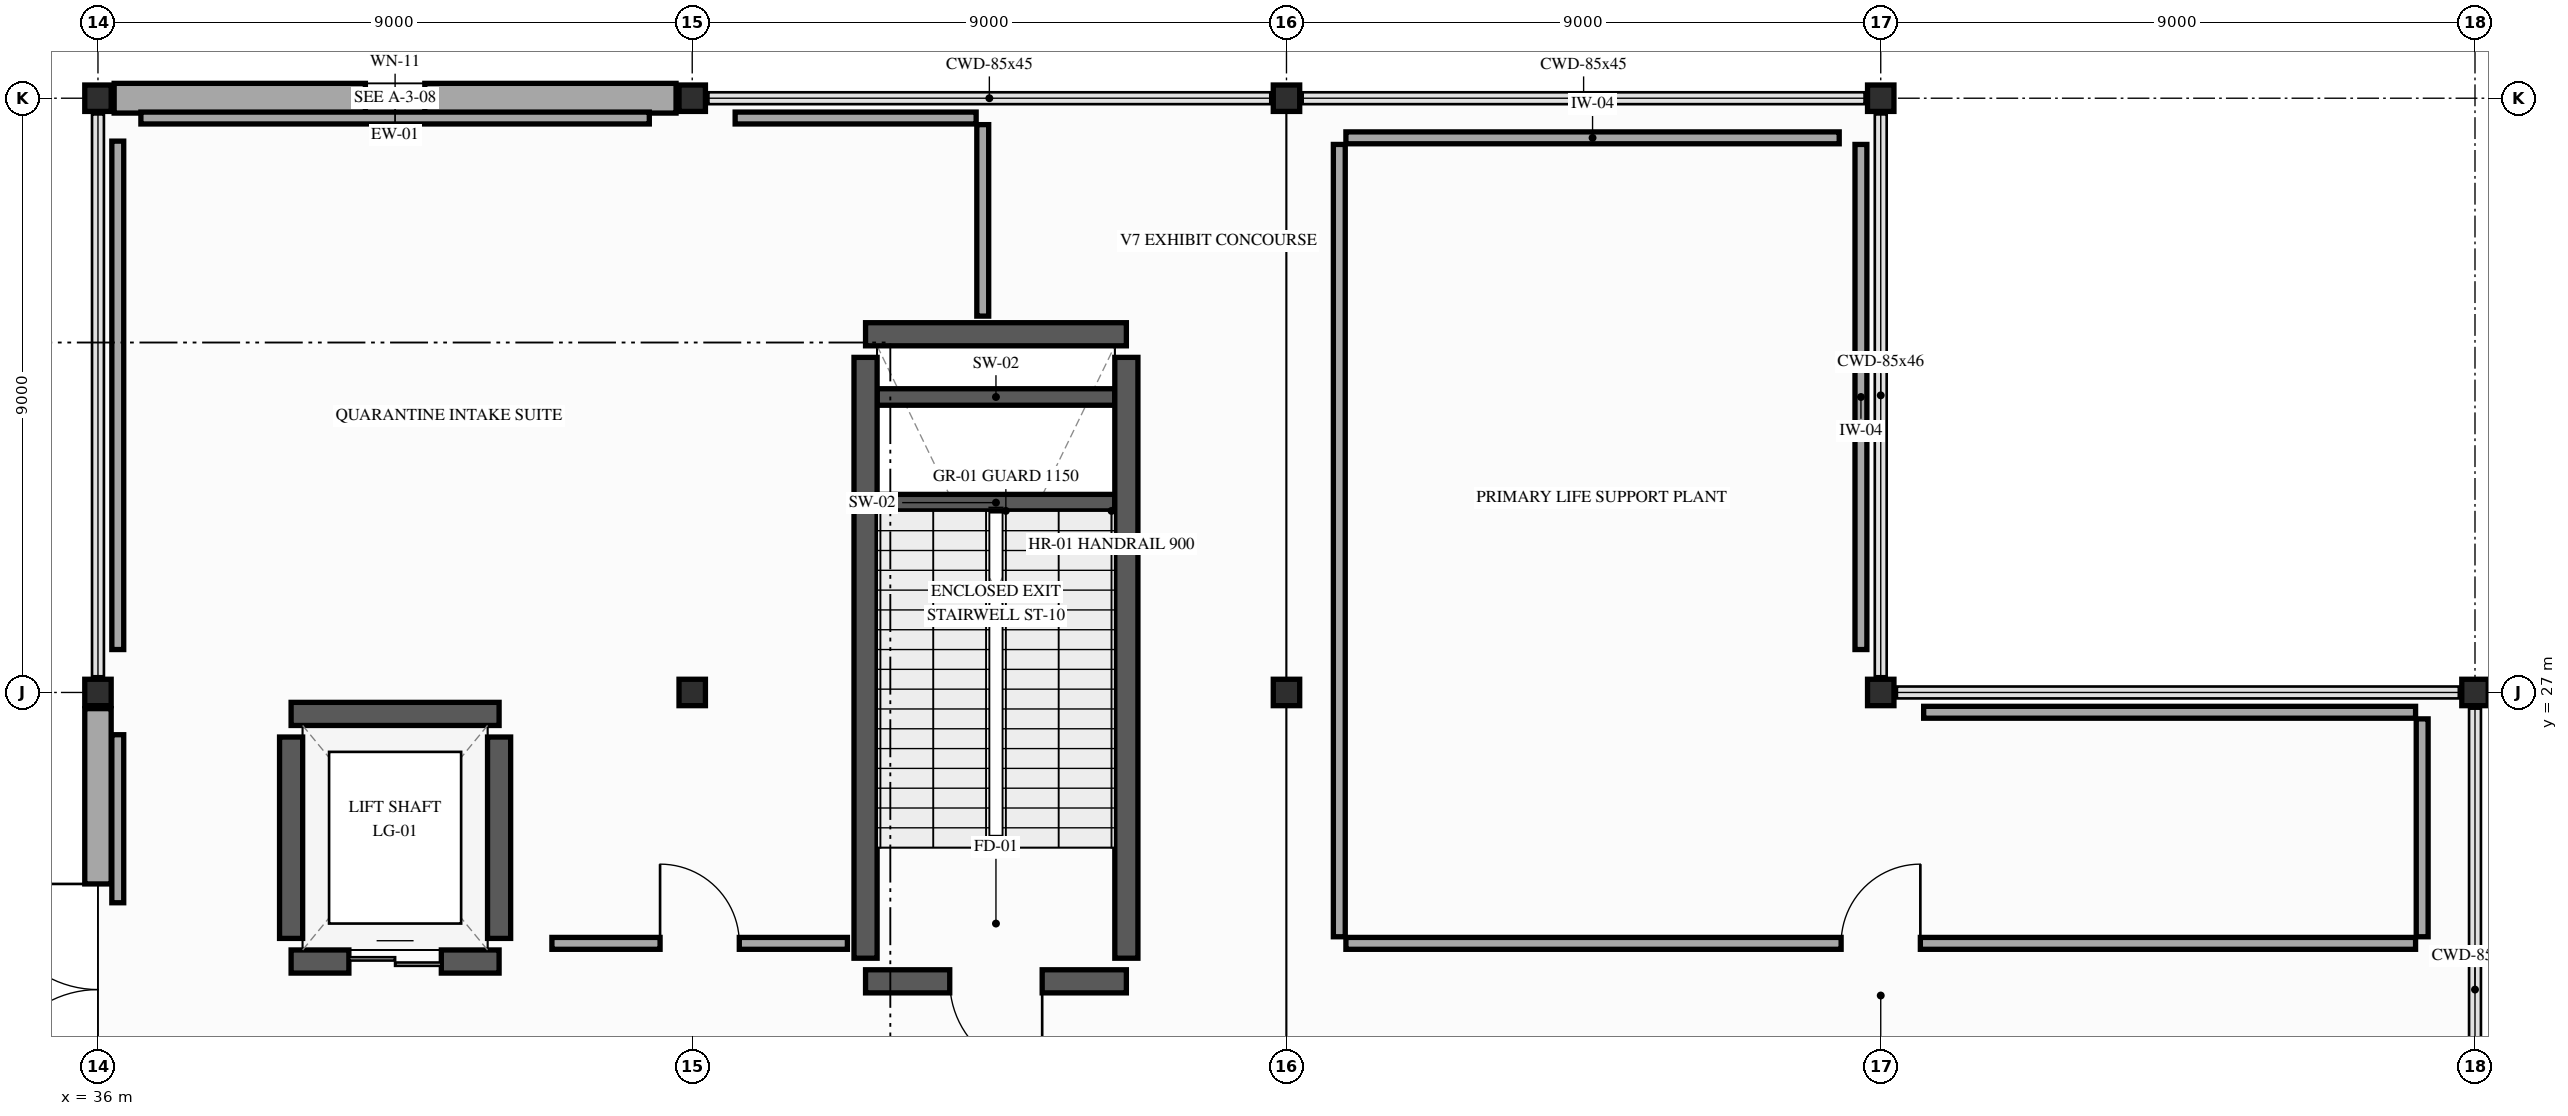
"""IFC4 building model, lengths in metres.
Left out: names, types, materials, properties, quantities, classifications, styles, units other than length and angle.
Written with IfcOpenShell. Run it as: python <this file> out.ifc"""

import sys

from ifc_helpers import new_model, si_unit, direction, frame, frame_2d, origin, origin_2d, place, context, subcontext, project, spatial, rectangle, i_section, extrude, element, fill, save


model = new_model("IFC4")
c1 = context("Model", 3, precision=1e-05, world=origin(), true_north=direction((0.0, 1.0)))
c2 = subcontext(c1, "Body", "Model", "MODEL_VIEW")
j1 = project(units=[si_unit("LENGTHUNIT", "METRE"), si_unit("PLANEANGLEUNIT", "RADIAN")], contexts=[c1])
p1 = place(None, origin())
s1 = spatial("IfcSite", under=j1, at=p1, CompositionType="ELEMENT")
p2 = place(p1, origin())
s2 = spatial("IfcBuilding", under=s1, at=p2, CompositionType="ELEMENT")
p3 = place(p2, origin())
s3 = spatial("IfcBuildingStorey", under=s2, at=p3, CompositionType="ELEMENT", Elevation=0.0)
for number, where, z_axis, x_axis in (
    (1, (36.0, 27.0, 0.0), (0.0, 0.0, 1.0), (1.0, 0.0, 0.0)),
    (2, (36.0, 36.0, 0.0), (0.0, 0.0, 1.0), (1.0, 0.0, 0.0)),
    (3, (45.0, 27.0, 0.0), (0.0, 0.0, 1.0), (1.0, 0.0, 0.0)),
    (4, (45.0, 36.0, 0.0), (0.0, 0.0, 1.0), (1.0, 0.0, 0.0)),
    (5, (54.0, 27.0, 0.0), (0.0, 0.0, 1.0), (1.0, 0.0, 0.0)),
    (6, (54.0, 36.0, 0.0), (0.0, 0.0, 1.0), (1.0, 0.0, 0.0)),
    (7, (63.0, 27.0, 0.0), (0.0, 0.0, 1.0), (1.0, 0.0, 0.0)),
    (8, (63.0, 36.0, 0.0), (0.0, 0.0, 1.0), (1.0, 0.0, 0.0)),
    (9, (72.0, 27.0, 0.0), (0.0, 0.0, 1.0), (1.0, 0.0, 0.0)),
):
    element("IfcColumn", number, at=place(p3, frame(where, z_axis=z_axis, x_axis=x_axis)), inside=s3, PredefinedType="COLUMN", context=c2, shape_type="SweptSolid", body=[
        extrude(i_section(OverallWidth=0.4, OverallDepth=0.4, WebThickness=0.013, FlangeThickness=0.021, FilletRadius=0.022, at=origin_2d()), origin(), (0.0, 0.0, 1.0), 5.4),
    ])
p4 = place(p3, frame((36.245, 36.0, 0.0), z_axis=(0.0, 0.0, 1.0), x_axis=(1.0, 0.0, 0.0)))
e10 = element("IfcWall", 10, at=p4, inside=s3, PredefinedType="SOLIDWALL", context=c2, shape_type="SweptSolid", body=[
    extrude(rectangle(XDim=8.51, YDim=0.45, at=frame_2d((4.255, 0.0))), origin(), (0.0, 0.0, 1.0), 4.517),
])
p5 = place(p4, frame((3.805, 0.0, 0.9)))
e11 = element("IfcOpeningElement", 11, at=p5, cuts=e10, PredefinedType="OPENING", context=c2, shape_type="SweptSolid", body=[
    extrude(rectangle(XDim=0.9, YDim=2.2, at=frame_2d((0.45, 1.1))), frame((0.0, 0.235, 0.0), z_axis=(0.0, -1.0, 0.0), x_axis=(1.0, 0.0, 0.0)), (0.0, 0.0, 1.0), 0.47),
])
p6 = place(p3, frame((36.0, 18.245, 0.0), z_axis=(0.0, 0.0, 1.0), x_axis=(0.0, 1.0, 0.0)))
e12 = element("IfcWall", 12, at=p6, inside=s3, PredefinedType="SOLIDWALL", context=c2, shape_type="SweptSolid", body=[
    extrude(rectangle(XDim=8.51, YDim=0.4, at=frame_2d((4.255, 0.0))), origin(), (0.0, 0.0, 1.0), 4.517),
])
p7 = place(p6, frame((2.655, 0.0, 0.0)))
e13 = element("IfcOpeningElement", 13, at=p7, cuts=e12, PredefinedType="OPENING", context=c2, shape_type="SweptSolid", body=[
    extrude(rectangle(XDim=3.2, YDim=2.8, at=frame_2d((1.6, 1.4))), frame((0.0, 0.21, 0.0), z_axis=(0.0, -1.0, 0.0), x_axis=(1.0, 0.0, 0.0)), (0.0, 0.0, 1.0), 0.42),
])
for number, where, z_axis, x_axis in (
    (14, (47.8, 29.875, 0.0), (0.0, 0.0, 1.0), (1.0, 0.0, 0.0)),
    (15, (47.8, 31.475, 0.0), (0.0, 0.0, 1.0), (1.0, 0.0, 0.0)),
):
    element("IfcWall", number, at=place(p3, frame(where, z_axis=z_axis, x_axis=x_axis)), inside=s3, PredefinedType="SHEAR", context=c2, shape_type="SweptSolid", body=[
        extrude(rectangle(XDim=3.6, YDim=0.25, at=frame_2d((1.8, 0.0))), origin(), (0.0, 0.0, 1.0), 2.5),
    ])
p8 = place(p3, frame((51.575, 22.625, 0.0), z_axis=(0.0, 0.0, 1.0), x_axis=(-1.0, 0.0, 0.0)))
e16 = element("IfcWall", 16, at=p8, inside=s3, PredefinedType="SHEAR", context=c2, shape_type="SweptSolid", body=[
    extrude(rectangle(XDim=3.95, YDim=0.35, at=frame_2d((1.975, 0.0))), origin(), (0.0, 0.0, 1.0), 5.12),
])
p9 = place(p8, frame((1.275, 0.0, 0.0)))
e17 = element("IfcOpeningElement", 17, at=p9, cuts=e16, PredefinedType="OPENING", context=c2, shape_type="SweptSolid", body=[
    extrude(rectangle(XDim=1.4, YDim=2.2, at=frame_2d((0.7, 1.1))), frame((0.0, 0.185, 0.0), z_axis=(0.0, -1.0, 0.0), x_axis=(1.0, 0.0, 0.0)), (0.0, 0.0, 1.0), 0.37),
])
p10 = place(p3, frame((47.625, 32.425, 0.0), z_axis=(0.0, 0.0, 1.0), x_axis=(1.0, 0.0, 0.0)))
e18 = element("IfcWall", 18, at=p10, inside=s3, PredefinedType="SHEAR", context=c2, shape_type="SweptSolid", body=[
    extrude(rectangle(XDim=3.95, YDim=0.35, at=frame_2d((1.975, 0.0))), origin(), (0.0, 0.0, 1.0), 5.12),
])
for number, where, z_axis, x_axis in (
    (19, (47.625, 22.975, 0.0), (0.0, 0.0, 1.0), (0.0, 1.0, 0.0)),
    (20, (51.575, 22.975, 0.0), (0.0, 0.0, 1.0), (0.0, 1.0, 0.0)),
):
    element("IfcWall", number, at=place(p3, frame(where, z_axis=z_axis, x_axis=x_axis)), inside=s3, PredefinedType="SHEAR", context=c2, shape_type="SweptSolid", body=[
        extrude(rectangle(XDim=9.1, YDim=0.35, at=frame_2d((4.55, 0.0))), origin(), (0.0, 0.0, 1.0), 5.12),
    ])
p11 = place(p3, frame((38.925, 22.925, 0.0), z_axis=(0.0, 0.0, 1.0), x_axis=(1.0, 0.0, 0.0)))
e21 = element("IfcWall", 21, at=p11, inside=s3, PredefinedType="SHEAR", context=c2, shape_type="SweptSolid", body=[
    extrude(rectangle(XDim=3.15, YDim=0.35, at=frame_2d((1.575, 0.0))), origin(), (0.0, 0.0, 1.0), 5.12),
])
p12 = place(p11, frame((0.875, 0.0, 0.0)))
e22 = element("IfcOpeningElement", 22, at=p12, cuts=e21, PredefinedType="OPENING", context=c2, shape_type="SweptSolid", body=[
    extrude(rectangle(XDim=1.4, YDim=2.3, at=frame_2d((0.7, 1.15))), frame((0.0, 0.185, 0.0), z_axis=(0.0, -1.0, 0.0), x_axis=(1.0, 0.0, 0.0)), (0.0, 0.0, 1.0), 0.37),
])
p13 = place(p3, frame((42.075, 26.675, 0.0), z_axis=(0.0, 0.0, 1.0), x_axis=(-1.0, 0.0, 0.0)))
e23 = element("IfcWall", 23, at=p13, inside=s3, PredefinedType="SHEAR", context=c2, shape_type="SweptSolid", body=[
    extrude(rectangle(XDim=3.15, YDim=0.35, at=frame_2d((1.575, 0.0))), origin(), (0.0, 0.0, 1.0), 5.12),
])
for number, where, z_axis, x_axis in (
    (24, (38.925, 23.275, 0.0), (0.0, 0.0, 1.0), (0.0, 1.0, 0.0)),
    (25, (42.075, 23.275, 0.0), (0.0, 0.0, 1.0), (0.0, 1.0, 0.0)),
):
    element("IfcWall", number, at=place(p3, frame(where, z_axis=z_axis, x_axis=x_axis)), inside=s3, PredefinedType="SHEAR", context=c2, shape_type="SweptSolid", body=[
        extrude(rectangle(XDim=3.05, YDim=0.35, at=frame_2d((1.525, 0.0))), origin(), (0.0, 0.0, 1.0), 5.12),
    ])
p14 = place(p3, frame((62.7, 27.65, 0.0), z_axis=(0.0, 0.0, 1.0), x_axis=(0.0, 1.0, 0.0)))
e26 = element("IfcWall", 26, at=p14, inside=s3, PredefinedType="PARTITIONING", context=c2, shape_type="SweptSolid", body=[
    extrude(rectangle(XDim=7.65, YDim=0.18, at=frame_2d((3.825, 0.0))), origin(), (0.0, 0.0, 1.0), 4.617),
])
p15 = place(p3, frame((62.371, 35.4, 0.0), z_axis=(0.0, 0.0, 1.0), x_axis=(-1.0, 0.0, 0.0)))
e27 = element("IfcWall", 27, at=p15, inside=s3, PredefinedType="PARTITIONING", context=c2, shape_type="SweptSolid", body=[
    extrude(rectangle(XDim=7.471, YDim=0.18, at=frame_2d((3.736, 0.0))), origin(), (0.0, 0.0, 1.0), 5.05),
])
p16 = place(p3, frame((54.8, 35.3, 0.0), z_axis=(0.0, 0.0, 1.0), x_axis=(0.0, -1.0, 0.0)))
e28 = element("IfcWall", 28, at=p16, inside=s3, PredefinedType="PARTITIONING", context=c2, shape_type="SweptSolid", body=[
    extrude(rectangle(XDim=12.0, YDim=0.18, at=frame_2d((6.0, 0.0))), origin(), (0.0, 0.0, 1.0), 4.517),
])
p17 = place(p3, frame((54.9, 23.2, 0.0), z_axis=(0.0, 0.0, 1.0), x_axis=(1.0, 0.0, 0.0)))
e29 = element("IfcWall", 29, at=p17, inside=s3, PredefinedType="PARTITIONING", context=c2, shape_type="SweptSolid", body=[
    extrude(rectangle(XDim=16.2, YDim=0.18, at=frame_2d((8.1, 0.0))), origin(), (0.0, 0.0, 1.0), 4.617),
])
p18 = place(p17, frame((7.5, 0.0, 0.0)))
e30 = element("IfcOpeningElement", 30, at=p18, cuts=e29, PredefinedType="OPENING", context=c2, shape_type="SweptSolid", body=[
    extrude(rectangle(XDim=1.2, YDim=2.2, at=frame_2d((0.6, 1.1))), frame((0.0, 0.1, 0.0), z_axis=(0.0, -1.0, 0.0), x_axis=(1.0, 0.0, 0.0)), (0.0, 0.0, 1.0), 0.2),
])
p19 = place(p3, frame((71.2, 23.3, 0.0), z_axis=(0.0, 0.0, 1.0), x_axis=(0.0, 1.0, 0.0)))
e31 = element("IfcWall", 31, at=p19, inside=s3, PredefinedType="PARTITIONING", context=c2, shape_type="SweptSolid", body=[
    extrude(rectangle(XDim=3.3, YDim=0.18, at=frame_2d((1.65, 0.0))), origin(), (0.0, 0.0, 1.0), 4.517),
])
p20 = place(p3, frame((71.1, 26.7, 0.0), z_axis=(0.0, 0.0, 1.0), x_axis=(-1.0, 0.0, 0.0)))
e32 = element("IfcWall", 32, at=p20, inside=s3, PredefinedType="PARTITIONING", context=c2, shape_type="SweptSolid", body=[
    extrude(rectangle(XDim=7.45, YDim=0.18, at=frame_2d((3.725, 0.0))), origin(), (0.0, 0.0, 1.0), 4.517),
])
p21 = place(p3, frame((36.3, 26.36, 0.0), z_axis=(0.0, 0.0, 1.0), x_axis=(0.0, -1.0, 0.0)))
e33 = element("IfcWall", 33, at=p21, inside=s3, PredefinedType="PARTITIONING", context=c2, shape_type="SweptSolid", body=[
    extrude(rectangle(XDim=2.545, YDim=0.18, at=frame_2d((1.272, 0.0))), origin(), (0.0, 0.0, 1.0), 4.617),
])
p22 = place(p3, frame((42.875, 23.2, 0.0), z_axis=(0.0, 0.0, 1.0), x_axis=(1.0, 0.0, 0.0)))
e34 = element("IfcWall", 34, at=p22, inside=s3, PredefinedType="PARTITIONING", context=c2, shape_type="SweptSolid", body=[
    extrude(rectangle(XDim=4.475, YDim=0.18, at=frame_2d((2.238, 0.0))), origin(), (0.0, 0.0, 1.0), 4.617),
])
p23 = place(p22, frame((1.638, 0.0, 0.0)))
e35 = element("IfcOpeningElement", 35, at=p23, cuts=e34, PredefinedType="OPENING", context=c2, shape_type="SweptSolid", body=[
    extrude(rectangle(XDim=1.2, YDim=2.2, at=frame_2d((0.6, 1.1))), frame((0.0, 0.1, 0.0), z_axis=(0.0, -1.0, 0.0), x_axis=(1.0, 0.0, 0.0)), (0.0, 0.0, 1.0), 0.2),
])
p24 = place(p3, frame((49.4, 32.7, 0.0), z_axis=(0.0, 0.0, 1.0), x_axis=(0.0, 1.0, 0.0)))
e36 = element("IfcWall", 36, at=p24, inside=s3, PredefinedType="PARTITIONING", context=c2, shape_type="SweptSolid", body=[
    extrude(rectangle(XDim=2.9, YDim=0.18, at=frame_2d((1.45, 0.0))), origin(), (0.0, 0.0, 1.0), 4.517),
])
p25 = place(p3, frame((49.3, 35.7, 0.0), z_axis=(0.0, 0.0, 1.0), x_axis=(-1.0, 0.0, 0.0)))
e37 = element("IfcWall", 37, at=p25, inside=s3, PredefinedType="PARTITIONING", context=c2, shape_type="SweptSolid", body=[
    extrude(rectangle(XDim=3.65, YDim=0.18, at=frame_2d((1.825, 0.0))), origin(), (0.0, 0.0, 1.0), 4.517),
])
p26 = place(p3, frame((44.35, 35.7, 0.0), z_axis=(0.0, 0.0, 1.0), x_axis=(-1.0, 0.0, 0.0)))
e38 = element("IfcWall", 38, at=p26, inside=s3, PredefinedType="PARTITIONING", context=c2, shape_type="SweptSolid", body=[
    extrude(rectangle(XDim=7.7, YDim=0.18, at=frame_2d((3.85, 0.0))), origin(), (0.0, 0.0, 1.0), 4.517),
])
p27 = place(p3, frame((36.3, 35.35, 0.0), z_axis=(0.0, 0.0, 1.0), x_axis=(0.0, -1.0, 0.0)))
e39 = element("IfcWall", 39, at=p27, inside=s3, PredefinedType="PARTITIONING", context=c2, shape_type="SweptSolid", body=[
    extrude(rectangle(XDim=7.7, YDim=0.18, at=frame_2d((3.85, 0.0))), origin(), (0.0, 0.0, 1.0), 4.617),
])
p28 = place(p5, origin())
e40 = element("IfcWindow", 40, at=p28, inside=s3, PartitioningType="SINGLE_PANEL", PredefinedType="WINDOW", context=c2, shape_type="SweptSolid", body=[
    extrude(rectangle(XDim=0.9, YDim=2.2, at=frame_2d((0.45, 1.1))), frame((0.0, 0.03, 0.0), z_axis=(0.0, -1.0, 0.0), x_axis=(1.0, 0.0, 0.0)), (0.0, 0.0, 1.0), 0.06),
])
fill(e11, e40)
p29 = place(p7, origin())
e41 = element("IfcDoor", 41, at=p29, inside=s3, OperationType="DOUBLE_DOOR_SINGLE_SWING", PredefinedType="DOOR", context=c2, shape_type="SweptSolid", body=[
    extrude(rectangle(XDim=3.2, YDim=2.8, at=frame_2d((1.6, 1.4))), frame((0.0, 0.025, 0.0), z_axis=(0.0, -1.0, 0.0), x_axis=(1.0, 0.0, 0.0)), (0.0, 0.0, 1.0), 0.05),
])
fill(e13, e41)
p30 = place(p9, origin())
e42 = element("IfcDoor", 42, at=p30, inside=s3, OperationType="SINGLE_SWING_LEFT", PredefinedType="DOOR", context=c2, shape_type="SweptSolid", body=[
    extrude(rectangle(XDim=1.4, YDim=2.2, at=frame_2d((0.7, 1.1))), frame((0.0, 0.025, 0.0), z_axis=(0.0, -1.0, 0.0), x_axis=(1.0, 0.0, 0.0)), (0.0, 0.0, 1.0), 0.05),
])
fill(e17, e42)
p31 = place(p12, origin())
e43 = element("IfcDoor", 43, at=p31, inside=s3, OperationType="DOUBLE_DOOR_SLIDING", PredefinedType="DOOR", context=c2, shape_type="SweptSolid", body=[
    extrude(rectangle(XDim=1.4, YDim=2.3, at=frame_2d((0.7, 1.15))), frame((0.0, 0.025, 0.0), z_axis=(0.0, -1.0, 0.0), x_axis=(1.0, 0.0, 0.0)), (0.0, 0.0, 1.0), 0.05),
])
fill(e22, e43)
p32 = place(p18, origin())
e44 = element("IfcDoor", 44, at=p32, inside=s3, OperationType="SINGLE_SWING_RIGHT", PredefinedType="DOOR", context=c2, shape_type="SweptSolid", body=[
    extrude(rectangle(XDim=1.2, YDim=2.2, at=frame_2d((0.6, 1.1))), frame((0.0, 0.025, 0.0), z_axis=(0.0, -1.0, 0.0), x_axis=(1.0, 0.0, 0.0)), (0.0, 0.0, 1.0), 0.05),
])
fill(e30, e44)
p33 = place(p23, origin())
e45 = element("IfcDoor", 45, at=p33, inside=s3, OperationType="SINGLE_SWING_LEFT", PredefinedType="DOOR", context=c2, shape_type="SweptSolid", body=[
    extrude(rectangle(XDim=1.2, YDim=2.2, at=frame_2d((0.6, 1.1))), frame((0.0, 0.025, 0.0), z_axis=(0.0, -1.0, 0.0), x_axis=(1.0, 0.0, 0.0)), (0.0, 0.0, 1.0), 0.05),
])
fill(e35, e45)
save(model, sys.argv[1])
